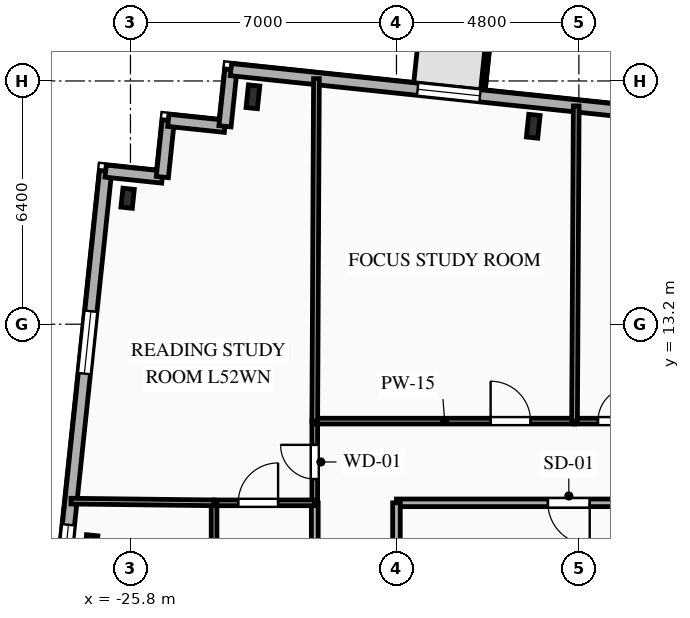
"""IFC4 building model, lengths in metres.
Left out: names, types, materials, properties, quantities, classifications, styles, units other than length and angle.
Written with IfcOpenShell. Run it as: python <this file> out.ifc"""

import sys

from ifc_helpers import new_model, si_unit, direction, frame, frame_2d, origin, origin_2d, place, context, subcontext, project, spatial, rectangle, i_section, extrude, element, fill, save


model = new_model("IFC4")
c1 = context("Model", 3, precision=1e-05, world=origin(), true_north=direction((0.0, 1.0)))
c2 = subcontext(c1, "Body", "Model", "MODEL_VIEW")
j1 = project(units=[si_unit("LENGTHUNIT", "METRE"), si_unit("PLANEANGLEUNIT", "RADIAN")], contexts=[c1])
p1 = place(None, origin())
s1 = spatial("IfcSite", under=j1, at=p1, CompositionType="ELEMENT")
p2 = place(p1, origin())
s2 = spatial("IfcBuilding", under=s1, at=p2, CompositionType="ELEMENT")
p3 = place(p2, frame((0.0, 0.0, 186.35)))
s3 = spatial("IfcBuildingStorey", under=s2, at=p3, CompositionType="ELEMENT", Elevation=186.35)
for number, where, z_axis, x_axis in (
    (1, (-15.201, 18.409, 0.0), (0.0, 0.0, 1.0), (0.995, -0.105, 0.0)),
    (2, (-22.577, 19.184, 0.0), (0.0, 0.0, 1.0), (0.995, -0.105, 0.0)),
):
    element("IfcColumn", number, at=place(p3, frame(where, z_axis=z_axis, x_axis=x_axis)), inside=s3, PredefinedType="COLUMN", context=c2, shape_type="SweptSolid", body=[
        extrude(i_section(OverallWidth=0.3, OverallDepth=0.6, WebThickness=0.015, FlangeThickness=0.03, FilletRadius=0.027, at=origin_2d()), origin(), (0.0, 0.0, 1.0), 3.35),
    ])
for number, where, z_axis, x_axis in (
    (3, (-25.875, 16.514, 0.0), (0.0, 0.0, 1.0), (0.995, -0.105, 0.0)),
    (4, (-26.833, 7.398, 0.0), (0.0, 0.0, 1.0), (0.995, -0.105, 0.0)),
):
    element("IfcColumn", number, at=place(p3, frame(where, z_axis=z_axis, x_axis=x_axis)), inside=s3, PredefinedType="COLUMN", context=c2, shape_type="SweptSolid", body=[
        extrude(i_section(OverallWidth=0.3, OverallDepth=0.5, WebThickness=0.014, FlangeThickness=0.028, FilletRadius=0.027, at=origin_2d()), origin(), (0.0, 0.0, 1.0), 3.35),
    ])
p4 = place(p3, frame((-29.463, -11.414, 0.0), z_axis=(0.0, 0.0, 1.0), x_axis=(0.104530779244, 0.994521651947, 0.0)))
e5 = element("IfcWall", 5, at=p4, inside=s3, PredefinedType="SOLIDWALL", context=c2, shape_type="SweptSolid", body=[
    extrude(rectangle(XDim=28.8, YDim=0.32, at=frame_2d((14.4, 0.0))), origin(), (0.0, 0.0, 1.0), 3.04),
])
p5 = place(p4, frame((2.384, 0.0, 0.85)))
e6 = element("IfcOpeningElement", 6, at=p5, cuts=e5, PredefinedType="OPENING", context=c2, shape_type="SweptSolid", body=[
    extrude(rectangle(XDim=1.65, YDim=1.85, at=frame_2d((0.825, 0.925))), frame((0.0, 0.17, 0.0), z_axis=(0.0, -1.0, 0.0), x_axis=(1.0, 0.0, 0.0)), (0.0, 0.0, 1.0), 0.34),
])
p6 = place(p4, frame((8.973, 0.0, 0.85)))
e7 = element("IfcOpeningElement", 7, at=p6, cuts=e5, PredefinedType="OPENING", context=c2, shape_type="SweptSolid", body=[
    extrude(rectangle(XDim=1.95, YDim=1.85, at=frame_2d((0.975, 0.925))), frame((0.0, 0.17, 0.0), z_axis=(0.0, -1.0, 0.0), x_axis=(1.0, 0.0, 0.0)), (0.0, 0.0, 1.0), 0.34),
])
p7 = place(p4, frame((12.286, 0.0, 0.85)))
e8 = element("IfcOpeningElement", 8, at=p7, cuts=e5, PredefinedType="OPENING", context=c2, shape_type="SweptSolid", body=[
    extrude(rectangle(XDim=1.5, YDim=1.85, at=frame_2d((0.75, 0.925))), frame((0.0, 0.17, 0.0), z_axis=(0.0, -1.0, 0.0), x_axis=(1.0, 0.0, 0.0)), (0.0, 0.0, 1.0), 0.34),
])
p8 = place(p4, frame((15.094, 0.0, 0.85)))
e9 = element("IfcOpeningElement", 9, at=p8, cuts=e5, PredefinedType="OPENING", context=c2, shape_type="SweptSolid", body=[
    extrude(rectangle(XDim=1.5, YDim=1.85, at=frame_2d((0.75, 0.925))), frame((0.0, 0.17, 0.0), z_axis=(0.0, -1.0, 0.0), x_axis=(1.0, 0.0, 0.0)), (0.0, 0.0, 1.0), 0.34),
])
p9 = place(p4, frame((17.942, 0.0, 0.85)))
e10 = element("IfcOpeningElement", 10, at=p9, cuts=e5, PredefinedType="OPENING", context=c2, shape_type="SweptSolid", body=[
    extrude(rectangle(XDim=1.5, YDim=1.85, at=frame_2d((0.75, 0.925))), frame((0.0, 0.17, 0.0), z_axis=(0.0, -1.0, 0.0), x_axis=(1.0, 0.0, 0.0)), (0.0, 0.0, 1.0), 0.34),
])
p10 = place(p4, frame((23.442, 0.0, 0.85)))
e11 = element("IfcOpeningElement", 11, at=p10, cuts=e5, PredefinedType="OPENING", context=c2, shape_type="SweptSolid", body=[
    extrude(rectangle(XDim=1.65, YDim=1.85, at=frame_2d((0.825, 0.925))), frame((0.0, 0.17, 0.0), z_axis=(0.0, -1.0, 0.0), x_axis=(1.0, 0.0, 0.0)), (0.0, 0.0, 1.0), 0.34),
])
p11 = place(p3, frame((-26.453, 17.229, 0.0), z_axis=(0.0, 0.0, 1.0), x_axis=(0.994508128223, -0.104659366031, 0.0)))
e12 = element("IfcWall", 12, at=p11, inside=s3, PredefinedType="SOLIDWALL", context=c2, shape_type="SweptSolid", body=[
    extrude(rectangle(XDim=1.5, YDim=0.32, at=frame_2d((0.75, 0.0))), origin(), (0.0, 0.0, 1.0), 3.04),
])
p12 = place(p3, frame((-24.961, 17.072, 0.0), z_axis=(0.0, 0.0, 1.0), x_axis=(0.104642427191, 0.994509910675, 0.0)))
e13 = element("IfcWall", 13, at=p12, inside=s3, PredefinedType="SOLIDWALL", context=c2, shape_type="SweptSolid", body=[
    extrude(rectangle(XDim=1.5, YDim=0.32, at=frame_2d((0.75, 0.0))), origin(), (0.0, 0.0, 1.0), 3.04),
])
p13 = place(p3, frame((-24.804, 18.563, 0.0), z_axis=(0.0, 0.0, 1.0), x_axis=(0.994508128223, -0.104659366031, 0.0)))
e14 = element("IfcWall", 14, at=p13, inside=s3, PredefinedType="SOLIDWALL", context=c2, shape_type="SweptSolid", body=[
    extrude(rectangle(XDim=1.5, YDim=0.32, at=frame_2d((0.75, 0.0))), origin(), (0.0, 0.0, 1.0), 3.04),
])
p14 = place(p3, frame((-23.312, 18.406, 0.0), z_axis=(0.0, 0.0, 1.0), x_axis=(0.104481464157, 0.994526834051, 0.0)))
e15 = element("IfcWall", 15, at=p14, inside=s3, PredefinedType="SOLIDWALL", context=c2, shape_type="SweptSolid", body=[
    extrude(rectangle(XDim=1.5, YDim=0.32, at=frame_2d((0.75, 0.0))), origin(), (0.0, 0.0, 1.0), 3.04),
])
p15 = place(p3, frame((-23.156, 19.898, 0.0), z_axis=(0.0, 0.0, 1.0), x_axis=(0.994522001802, -0.104527450613, 0.0)))
e16 = element("IfcWall", 16, at=p15, inside=s3, PredefinedType="SOLIDWALL", context=c2, shape_type="SweptSolid", body=[
    extrude(rectangle(XDim=45.8, YDim=0.32, at=frame_2d((22.9, 0.0))), origin(), (0.0, 0.0, 1.0), 3.04),
])
p16 = place(p15, frame((4.94, 0.0, 0.85)))
e17 = element("IfcOpeningElement", 17, at=p16, cuts=e16, PredefinedType="OPENING", context=c2, shape_type="SweptSolid", body=[
    extrude(rectangle(XDim=1.65, YDim=1.85, at=frame_2d((0.825, 0.925))), frame((0.0, 0.17, 0.0), z_axis=(0.0, -1.0, 0.0), x_axis=(1.0, 0.0, 0.0)), (0.0, 0.0, 1.0), 0.34),
])
p17 = place(p15, frame((12.622, 0.0, 0.85)))
e18 = element("IfcOpeningElement", 18, at=p17, cuts=e16, PredefinedType="OPENING", context=c2, shape_type="SweptSolid", body=[
    extrude(rectangle(XDim=1.5, YDim=1.85, at=frame_2d((0.75, 0.925))), frame((0.0, 0.17, 0.0), z_axis=(0.0, -1.0, 0.0), x_axis=(1.0, 0.0, 0.0)), (0.0, 0.0, 1.0), 0.34),
])
p18 = place(p15, frame((17.116, 0.0, 0.85)))
e19 = element("IfcOpeningElement", 19, at=p18, cuts=e16, PredefinedType="OPENING", context=c2, shape_type="SweptSolid", body=[
    extrude(rectangle(XDim=2.2, YDim=1.85, at=frame_2d((1.1, 0.925))), frame((0.0, 0.17, 0.0), z_axis=(0.0, -1.0, 0.0), x_axis=(1.0, 0.0, 0.0)), (0.0, 0.0, 1.0), 0.34),
])
p19 = place(p15, frame((23.121, 0.0, 0.85)))
e20 = element("IfcOpeningElement", 20, at=p19, cuts=e16, PredefinedType="OPENING", context=c2, shape_type="SweptSolid", body=[
    extrude(rectangle(XDim=2.2, YDim=1.85, at=frame_2d((1.1, 0.925))), frame((0.0, 0.17, 0.0), z_axis=(0.0, -1.0, 0.0), x_axis=(1.0, 0.0, 0.0)), (0.0, 0.0, 1.0), 0.34),
])
p20 = place(p15, frame((29.126, 0.0, 0.85)))
e21 = element("IfcOpeningElement", 21, at=p20, cuts=e16, PredefinedType="OPENING", context=c2, shape_type="SweptSolid", body=[
    extrude(rectangle(XDim=2.2, YDim=1.85, at=frame_2d((1.1, 0.925))), frame((0.0, 0.17, 0.0), z_axis=(0.0, -1.0, 0.0), x_axis=(1.0, 0.0, 0.0)), (0.0, 0.0, 1.0), 0.34),
])
p21 = place(p15, frame((35.172, 0.0, 0.85)))
e22 = element("IfcOpeningElement", 22, at=p21, cuts=e16, PredefinedType="OPENING", context=c2, shape_type="SweptSolid", body=[
    extrude(rectangle(XDim=2.2, YDim=1.85, at=frame_2d((1.1, 0.925))), frame((0.0, 0.17, 0.0), z_axis=(0.0, -1.0, 0.0), x_axis=(1.0, 0.0, 0.0)), (0.0, 0.0, 1.0), 0.34),
])
p22 = place(p15, frame((41.052, 0.0, 0.85)))
e23 = element("IfcOpeningElement", 23, at=p22, cuts=e16, PredefinedType="OPENING", context=c2, shape_type="SweptSolid", body=[
    extrude(rectangle(XDim=1.65, YDim=1.85, at=frame_2d((0.825, 0.925))), frame((0.0, 0.17, 0.0), z_axis=(0.0, -1.0, 0.0), x_axis=(1.0, 0.0, 0.0)), (0.0, 0.0, 1.0), 0.34),
])
p23 = place(p3, frame((-12.0, 8.5, 0.0), z_axis=(0.0, 0.0, 1.0), x_axis=(-1.0, 0.0, 0.0)))
e24 = element("IfcWall", 24, at=p23, inside=s3, PredefinedType="PARTITIONING", context=c2, shape_type="SweptSolid", body=[
    extrude(rectangle(XDim=6.8, YDim=0.2, at=frame_2d((3.4, 0.0))), origin(), (0.0, 0.0, 1.0), 3.04),
])
p24 = place(p23, frame((1.715, 0.0, 0.0)))
e25 = element("IfcOpeningElement", 25, at=p24, cuts=e24, PredefinedType="OPENING", context=c2, shape_type="SweptSolid", body=[
    extrude(rectangle(XDim=1.1, YDim=2.15, at=frame_2d((0.55, 1.075))), frame((0.0, 0.11, 0.0), z_axis=(0.0, -1.0, 0.0), x_axis=(1.0, 0.0, 0.0)), (0.0, 0.0, 1.0), 0.22),
])
p25 = place(p3, frame((-18.8, 8.5, 0.0), z_axis=(0.0, 0.0, 1.0), x_axis=(0.0, -1.0, 0.0)))
e26 = element("IfcWall", 26, at=p25, inside=s3, PredefinedType="PARTITIONING", context=c2, shape_type="SweptSolid", body=[
    extrude(rectangle(XDim=2.9, YDim=0.2, at=frame_2d((1.45, 0.0))), origin(), (0.0, 0.0, 1.0), 2.665),
])
p26 = place(p3, frame((-20.95, 8.5, 0.0), z_axis=(0.0, 0.0, 1.0), x_axis=(0.0, 1.0, 0.0)))
e27 = element("IfcWall", 27, at=p26, inside=s3, PredefinedType="PARTITIONING", context=c2, shape_type="SweptSolid", body=[
    extrude(rectangle(XDim=2.15, YDim=0.15, at=frame_2d((1.075, 0.0))), origin(), (0.0, 0.0, 1.0), 3.04),
])
p27 = place(p26, frame((0.625, 0.0, 0.0)))
e28 = element("IfcOpeningElement", 28, at=p27, cuts=e27, PredefinedType="OPENING", context=c2, shape_type="SweptSolid", body=[
    extrude(rectangle(XDim=0.9, YDim=2.1, at=frame_2d((0.45, 1.05))), frame((0.0, 0.085, 0.0), z_axis=(0.0, -1.0, 0.0), x_axis=(1.0, 0.0, 0.0)), (0.0, 0.0, 1.0), 0.17),
])
p28 = place(p3, frame((-20.95, 10.65, 0.0), z_axis=(0.0, 0.0, 1.0), x_axis=(1.0, 0.0, 0.0)))
e29 = element("IfcWall", 29, at=p28, inside=s3, PredefinedType="PARTITIONING", context=c2, shape_type="SweptSolid", body=[
    extrude(rectangle(XDim=6.836, YDim=0.15, at=frame_2d((3.418, 0.0))), origin(), (0.0, 0.0, 1.0), 3.04),
])
p29 = place(p28, frame((4.628, 0.0, 0.0)))
e30 = element("IfcOpeningElement", 30, at=p29, cuts=e29, PredefinedType="OPENING", context=c2, shape_type="SweptSolid", body=[
    extrude(rectangle(XDim=1.05, YDim=2.15, at=frame_2d((0.525, 1.075))), frame((0.0, 0.085, 0.0), z_axis=(0.0, -1.0, 0.0), x_axis=(1.0, 0.0, 0.0)), (0.0, 0.0, 1.0), 0.17),
])
p30 = place(p3, frame((-14.114, 10.65, 0.0), z_axis=(0.0, 0.0, 1.0), x_axis=(1.0, 0.0, 0.0)))
e31 = element("IfcWall", 31, at=p30, inside=s3, PredefinedType="PLUMBINGWALL", context=c2, shape_type="SweptSolid", body=[
    extrude(rectangle(XDim=2.35, YDim=0.15, at=frame_2d((1.175, 0.0))), origin(), (0.0, 0.0, 1.0), 3.04),
])
p31 = place(p30, frame((0.616, 0.0, 0.0)))
e32 = element("IfcOpeningElement", 32, at=p31, cuts=e31, PredefinedType="OPENING", context=c2, shape_type="SweptSolid", body=[
    extrude(rectangle(XDim=0.9, YDim=2.1, at=frame_2d((0.45, 1.05))), frame((0.0, 0.085, 0.0), z_axis=(0.0, -1.0, 0.0), x_axis=(1.0, 0.0, 0.0)), (0.0, 0.0, 1.0), 0.17),
])
p32 = place(p3, frame((-20.95, -5.6, 0.0), z_axis=(0.0, 0.0, 1.0), x_axis=(0.0, 1.0, 0.0)))
e33 = element("IfcWall", 33, at=p32, inside=s3, PredefinedType="PARTITIONING", context=c2, shape_type="SweptSolid", body=[
    extrude(rectangle(XDim=14.1, YDim=0.18, at=frame_2d((7.05, 0.0))), origin(), (0.0, 0.0, 1.0), 3.04),
])
p33 = place(p32, frame((5.058, 0.0, 0.0)))
e34 = element("IfcOpeningElement", 34, at=p33, cuts=e33, PredefinedType="OPENING", context=c2, shape_type="SweptSolid", body=[
    extrude(rectangle(XDim=1.0, YDim=2.15, at=frame_2d((0.5, 1.075))), frame((0.0, 0.1, 0.0), z_axis=(0.0, -1.0, 0.0), x_axis=(1.0, 0.0, 0.0)), (0.0, 0.0, 1.0), 0.2),
])
p34 = place(p3, frame((-23.6, 8.5, 0.0), z_axis=(0.0, 0.0, 1.0), x_axis=(1.0, 0.0, 0.0)))
e35 = element("IfcWall", 35, at=p34, inside=s3, PredefinedType="PARTITIONING", context=c2, shape_type="SweptSolid", body=[
    extrude(rectangle(XDim=2.65, YDim=0.15, at=frame_2d((1.325, 0.0))), origin(), (0.0, 0.0, 1.0), 3.04),
])
p35 = place(p34, frame((0.635, 0.0, 0.0)))
e36 = element("IfcOpeningElement", 36, at=p35, cuts=e35, PredefinedType="OPENING", context=c2, shape_type="SweptSolid", body=[
    extrude(rectangle(XDim=1.05, YDim=2.15, at=frame_2d((0.525, 1.075))), frame((0.0, 0.085, 0.0), z_axis=(0.0, -1.0, 0.0), x_axis=(1.0, 0.0, 0.0)), (0.0, 0.0, 1.0), 0.17),
])
p36 = place(p3, frame((-23.6, 5.68, 0.0), z_axis=(0.0, 0.0, 1.0), x_axis=(0.0, 1.0, 0.0)))
e37 = element("IfcWall", 37, at=p36, inside=s3, PredefinedType="PARTITIONING", context=c2, shape_type="SweptSolid", body=[
    extrude(rectangle(XDim=2.82, YDim=0.15, at=frame_2d((1.41, 0.0))), origin(), (0.0, 0.0, 1.0), 3.04),
])
p37 = place(p36, frame((0.669, 0.0, 0.0)))
e38 = element("IfcOpeningElement", 38, at=p37, cuts=e37, PredefinedType="OPENING", context=c2, shape_type="SweptSolid", body=[
    extrude(rectangle(XDim=0.95, YDim=2.1, at=frame_2d((0.475, 1.05))), frame((0.0, 0.085, 0.0), z_axis=(0.0, -1.0, 0.0), x_axis=(1.0, 0.0, 0.0)), (0.0, 0.0, 1.0), 0.17),
])
p38 = place(p3, frame((-23.6, 8.5, 0.0), z_axis=(0.0, 0.0, 1.0), x_axis=(-0.999931911052, 0.011669329875, 0.0)))
e39 = element("IfcWall", 39, at=p38, inside=s3, PredefinedType="PARTITIONING", context=c2, shape_type="SweptSolid", body=[
    extrude(rectangle(XDim=3.766, YDim=0.15, at=frame_2d((1.883, 0.0))), origin(), (0.0, 0.0, 1.0), 3.04),
])
p39 = place(p3, frame((-20.906, 19.662, 0.0), z_axis=(0.0, 0.0, 1.0), x_axis=(-0.004876272857, -0.999988110911, 0.0)))
e40 = element("IfcWall", 40, at=p39, inside=s3, PredefinedType="PARTITIONING", context=c2, shape_type="SweptSolid", body=[
    extrude(rectangle(XDim=9.012, YDim=0.15, at=frame_2d((4.506, 0.0))), origin(), (0.0, 0.0, 1.0), 2.665),
])
p40 = place(p3, frame((-14.07, 18.943, 0.0), z_axis=(0.0, 0.0, 1.0), x_axis=(-0.005298718667, -0.999985961692, 0.0)))
e41 = element("IfcWall", 41, at=p40, inside=s3, PredefinedType="PLUMBINGWALL", context=c2, shape_type="SweptSolid", body=[
    extrude(rectangle(XDim=8.293, YDim=0.15, at=frame_2d((4.147, 0.0))), origin(), (0.0, 0.0, 1.0), 3.04),
])
p41 = place(p9, origin())
e42 = element("IfcWindow", 42, at=p41, inside=s3, PartitioningType="SINGLE_PANEL", PredefinedType="WINDOW", context=c2, shape_type="SweptSolid", body=[
    extrude(rectangle(XDim=1.5, YDim=1.85, at=frame_2d((0.75, 0.925))), frame((0.0, 0.03, 0.0), z_axis=(0.0, -1.0, 0.0), x_axis=(1.0, 0.0, 0.0)), (0.0, 0.0, 1.0), 0.06),
])
fill(e10, e42)
p42 = place(p10, origin())
e43 = element("IfcWindow", 43, at=p42, inside=s3, PartitioningType="SINGLE_PANEL", PredefinedType="WINDOW", context=c2, shape_type="SweptSolid", body=[
    extrude(rectangle(XDim=1.65, YDim=1.85, at=frame_2d((0.825, 0.925))), frame((0.0, 0.03, 0.0), z_axis=(0.0, -1.0, 0.0), x_axis=(1.0, 0.0, 0.0)), (0.0, 0.0, 1.0), 0.06),
])
fill(e11, e43)
p43 = place(p16, origin())
e44 = element("IfcWindow", 44, at=p43, inside=s3, PartitioningType="SINGLE_PANEL", PredefinedType="WINDOW", context=c2, shape_type="SweptSolid", body=[
    extrude(rectangle(XDim=1.65, YDim=1.85, at=frame_2d((0.825, 0.925))), frame((0.0, 0.03, 0.0), z_axis=(0.0, -1.0, 0.0), x_axis=(1.0, 0.0, 0.0)), (0.0, 0.0, 1.0), 0.06),
])
fill(e17, e44)
p44 = place(p24, origin())
e45 = element("IfcDoor", 45, at=p44, inside=s3, OperationType="SINGLE_SWING_LEFT", PredefinedType="DOOR", context=c2, shape_type="SweptSolid", body=[
    extrude(rectangle(XDim=1.1, YDim=2.15, at=frame_2d((0.55, 1.075))), frame((0.0, 0.025, 0.0), z_axis=(0.0, -1.0, 0.0), x_axis=(1.0, 0.0, 0.0)), (0.0, 0.0, 1.0), 0.05),
])
fill(e25, e45)
p45 = place(p27, origin())
e46 = element("IfcDoor", 46, at=p45, inside=s3, OperationType="SINGLE_SWING_RIGHT", PredefinedType="DOOR", context=c2, shape_type="SweptSolid", body=[
    extrude(rectangle(XDim=0.9, YDim=2.1, at=frame_2d((0.45, 1.05))), frame((0.0, 0.025, 0.0), z_axis=(0.0, -1.0, 0.0), x_axis=(1.0, 0.0, 0.0)), (0.0, 0.0, 1.0), 0.05),
])
fill(e28, e46)
p46 = place(p29, origin())
e47 = element("IfcDoor", 47, at=p46, inside=s3, OperationType="SINGLE_SWING_LEFT", PredefinedType="DOOR", context=c2, shape_type="SweptSolid", body=[
    extrude(rectangle(XDim=1.05, YDim=2.15, at=frame_2d((0.525, 1.075))), frame((0.0, 0.025, 0.0), z_axis=(0.0, -1.0, 0.0), x_axis=(1.0, 0.0, 0.0)), (0.0, 0.0, 1.0), 0.05),
])
fill(e30, e47)
p47 = place(p31, origin())
e48 = element("IfcDoor", 48, at=p47, inside=s3, OperationType="SINGLE_SWING_RIGHT", PredefinedType="DOOR", context=c2, shape_type="SweptSolid", body=[
    extrude(rectangle(XDim=0.9, YDim=2.1, at=frame_2d((0.45, 1.05))), frame((0.0, 0.025, 0.0), z_axis=(0.0, -1.0, 0.0), x_axis=(1.0, 0.0, 0.0)), (0.0, 0.0, 1.0), 0.05),
])
fill(e32, e48)
p48 = place(p35, origin())
e49 = element("IfcDoor", 49, at=p48, inside=s3, OperationType="SINGLE_SWING_RIGHT", PredefinedType="DOOR", context=c2, shape_type="SweptSolid", body=[
    extrude(rectangle(XDim=1.05, YDim=2.15, at=frame_2d((0.525, 1.075))), frame((0.0, 0.025, 0.0), z_axis=(0.0, -1.0, 0.0), x_axis=(1.0, 0.0, 0.0)), (0.0, 0.0, 1.0), 0.05),
])
fill(e36, e49)
save(model, sys.argv[1])
